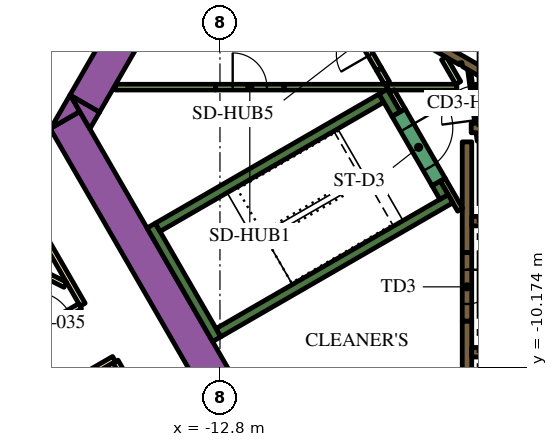
"""IFC4 building model, lengths in metres.
Left out: names, types, materials, properties, quantities, classifications, styles, units other than length and angle.
Written with IfcOpenShell. Run it as: python <this file> out.ifc"""

import sys

from ifc_helpers import new_model, si_unit, direction, frame, frame_2d, origin, place, context, subcontext, project, spatial, polyline, rectangle, outline, extrude, element, fill, save


model = new_model("IFC4")
c1 = context("Model", 3, precision=1e-05, world=origin(), true_north=direction((0.0, 1.0)))
c2 = subcontext(c1, "Body", "Model", "MODEL_VIEW")
j1 = project(units=[si_unit("LENGTHUNIT", "METRE"), si_unit("PLANEANGLEUNIT", "RADIAN")], contexts=[c1])
p1 = place(None, origin())
s1 = spatial("IfcSite", under=j1, at=p1, CompositionType="ELEMENT")
p2 = place(p1, origin())
s2 = spatial("IfcBuilding", under=s1, at=p2, CompositionType="ELEMENT")
p3 = place(p2, frame((0.0, 0.0, 126.6)))
s3 = spatial("IfcBuildingStorey", under=s2, at=p3, CompositionType="ELEMENT", Elevation=126.6)
p4 = place(p3, frame((-12.134, -11.883, 0.0), z_axis=(0.0, 0.0, 1.0), x_axis=(-0.500005339912, 0.866022320763, 0.0)))
e1 = element("IfcWall", 1, at=p4, inside=s3, PredefinedType="SOLIDWALL", context=c2, shape_type="SweptSolid", body=[
    extrude(rectangle(XDim=9.488, YDim=0.9, at=frame_2d((4.744, 0.0))), origin(), (0.0, 0.0, 1.0), 3.9),
])
p5 = place(p3, origin())
e2 = element("IfcWall", 2, at=p5, inside=s3, PredefinedType="SOLIDWALL", context=c2, shape_type="SweptSolid", body=[
    extrude(outline(polyline([(-16.489, -3.44), (-17.251, -3.88), (-16.743, -3.0), (-16.489, -3.44)])), origin(), (0.0, 0.0, 1.0), 3.9),
])
p6 = place(p3, frame((-15.118, -1.085, 0.0), z_axis=(0.0, 0.0, 1.0), x_axis=(-0.50006606081, -0.865987260198, 0.0)))
e3 = element("IfcWall", 3, at=p6, inside=s3, PredefinedType="SOLIDWALL", context=c2, shape_type="SweptSolid", body=[
    extrude(rectangle(XDim=2.481, YDim=0.9, at=frame_2d((1.24, 0.0))), origin(), (0.0, 0.0, 1.0), 3.9),
])
e4 = element("IfcWall", 4, at=p5, inside=s3, PredefinedType="SOLIDWALL", context=c2, shape_type="SweptSolid", body=[
    extrude(outline(polyline([(-16.223, -3.9), (-16.732, -3.02), (-15.969, -3.46), (-16.223, -3.9)])), origin(), (0.0, 0.0, 1.0), 3.9),
])
p7 = place(p3, frame((-12.885, -9.431, 0.0), z_axis=(0.0, 0.0, 1.0), x_axis=(-0.500020560727, 0.866013532718, 0.0)))
e5 = element("IfcWall", 5, at=p7, inside=s3, PredefinedType="SOLIDWALL", context=c2, shape_type="SweptSolid", body=[
    extrude(rectangle(XDim=3.45, YDim=0.25, at=frame_2d((1.725, 0.0))), origin(), (0.0, 0.0, 1.0), 3.9),
])
p8 = place(p3, frame((-14.44, -6.49, 0.0), z_axis=(0.0, 0.0, 1.0), x_axis=(0.866022966069, 0.500004222222, 0.0)))
e6 = element("IfcWall", 6, at=p8, inside=s3, PredefinedType="SOLIDWALL", context=c2, shape_type="SweptSolid", body=[
    extrude(rectangle(XDim=6.8, YDim=0.25, at=frame_2d((3.4, 0.0))), origin(), (0.0, 0.0, 1.0), 3.9),
])
p9 = place(p3, frame((-8.163, -3.511, 0.0), z_axis=(0.0, 0.0, 1.0), x_axis=(-0.500206266495, 0.865906283012, 0.0)))
e7 = element("IfcWall", 7, at=p9, inside=s3, PredefinedType="SOLIDWALL", context=c2, shape_type="SweptSolid", body=[
    extrude(rectangle(XDim=0.684, YDim=0.25, at=frame_2d((0.342, 0.0))), origin(), (0.0, 0.0, 1.0), 3.9),
])
p10 = place(p3, frame((-12.84, -9.261, 0.0), z_axis=(0.0, 0.0, 1.0), x_axis=(0.866016039709, 0.500016218704, 0.0)))
e8 = element("IfcWall", 8, at=p10, inside=s3, PredefinedType="SOLIDWALL", context=c2, shape_type="SweptSolid", body=[
    extrude(rectangle(XDim=7.05, YDim=0.25, at=frame_2d((3.525, 0.0))), origin(), (0.0, 0.0, 1.0), 3.9),
])
p11 = place(p3, frame((-6.905, -5.69, 0.0), z_axis=(0.0, 0.0, 1.0), x_axis=(-0.499993700073, 0.866029041019, 0.0)))
e9 = element("IfcWall", 9, at=p11, inside=s3, PredefinedType="SOLIDWALL", context=c2, shape_type="SweptSolid", body=[
    extrude(rectangle(XDim=0.416, YDim=0.25, at=frame_2d((0.208, 0.0))), origin(), (0.0, 0.0, 1.0), 3.9),
])
p12 = place(p3, frame((-6.3, -12.1, 0.0), z_axis=(0.0, 0.0, 1.0), x_axis=(0.0, 1.0, 0.0)))
e10 = element("IfcWall", 10, at=p12, inside=s3, PredefinedType="SOLIDWALL", context=c2, shape_type="SweptSolid", body=[
    extrude(rectangle(XDim=3.146, YDim=0.25, at=frame_2d((1.573, 0.0))), origin(), (0.0, 0.0, 1.0), 3.9),
])
p13 = place(p3, frame((-6.3, -4.24, 0.0), z_axis=(0.0, 0.0, 1.0), x_axis=(0.0, -1.0, 0.0)))
e11 = element("IfcWall", 11, at=p13, inside=s3, PredefinedType="SOLIDWALL", context=c2, shape_type="SweptSolid", body=[
    extrude(rectangle(XDim=2.914, YDim=0.25, at=frame_2d((1.457, 0.0))), origin(), (0.0, 0.0, 1.0), 3.9),
])
p14 = place(p3, frame((-6.19, -3.875, 0.0), z_axis=(0.0, 0.0, 1.0), x_axis=(1.0, 0.0, 0.0)))
e12 = element("IfcWall", 12, at=p14, inside=s3, PredefinedType="SOLIDWALL", context=c2, shape_type="SweptSolid", body=[
    extrude(rectangle(XDim=12.615, YDim=0.25, at=frame_2d((6.307, 0.0))), origin(), (0.0, 0.0, 1.0), 3.9),
])
e13 = element("IfcWall", 13, at=p5, inside=s3, PredefinedType="SOLIDWALL", context=c2, shape_type="SweptSolid", body=[
    extrude(outline(polyline([(-5.922, -2.257), (-5.922, -2.257), (-5.705, -2.382), (-5.83, -2.598), (-6.418, -2.258), (-6.433, -2.153), (-6.433, -2.153), (-6.433, -2.153), (-6.508, -2.163), (-6.508, -2.163), (-6.508, -2.163), (-6.501, -2.21), (-7.952, -1.373), (-7.827, -1.156), (-5.922, -2.257)])), origin(), (0.0, 0.0, 1.0), 3.9),
])
p15 = place(p3, frame((-6.48, -6.027, 0.0), z_axis=(0.0, 0.0, 1.0), x_axis=(-0.499936960004, 0.866061796884, 0.0)))
e14 = element("IfcWall", 14, at=p15, inside=s3, PredefinedType="PARTITIONING", context=c2, shape_type="SweptSolid", body=[
    extrude(rectangle(XDim=0.919, YDim=0.15, at=frame_2d((0.46, 0.0))), origin(), (0.0, 0.0, 1.0), 3.9),
])
p16 = place(p3, frame((-12.915, -2.8, 0.0), z_axis=(0.0, 0.0, 1.0), x_axis=(-1.0, 0.0, 0.0)))
e15 = element("IfcWall", 15, at=p16, inside=s3, PredefinedType="PARTITIONING", context=c2, shape_type="SweptSolid", body=[
    extrude(rectangle(XDim=2.637, YDim=0.15, at=frame_2d((1.318, 0.0))), origin(), (0.0, 0.0, 1.0), 2.75),
])
p17 = place(p3, frame((-8.395, -2.8, 0.0), z_axis=(0.0, 0.0, 1.0), x_axis=(1.0, 0.0, 0.0)))
e16 = element("IfcWall", 16, at=p17, inside=s3, PredefinedType="PARTITIONING", context=c2, shape_type="SweptSolid", body=[
    extrude(rectangle(XDim=1.828, YDim=0.15, at=frame_2d((0.914, 0.0))), origin(), (0.0, 0.0, 1.0), 2.75),
])
p18 = place(p3, frame((-11.115, -2.8, 0.0), z_axis=(0.0, 0.0, 1.0), x_axis=(1.0, 0.0, 0.0)))
e17 = element("IfcWall", 17, at=p18, inside=s3, PredefinedType="PARTITIONING", context=c2, shape_type="SweptSolid", body=[
    extrude(rectangle(XDim=2.708, YDim=0.15, at=frame_2d((1.354, 0.0))), origin(), (0.0, 0.0, 1.0), 2.75),
])
p19 = place(p3, frame((-6.531, -2.689, 0.0), z_axis=(0.0, 0.0, 1.0), x_axis=(-0.499967446111, 0.866044197965, 0.0)))
e18 = element("IfcWall", 18, at=p19, inside=s3, PredefinedType="PARTITIONING", context=c2, shape_type="SweptSolid", body=[
    extrude(rectangle(XDim=0.748, YDim=0.15, at=frame_2d((0.374, 0.0))), origin(), (0.0, 0.0, 1.0), 2.75),
])
p20 = place(p3, frame((-7.99, -3.412, 0.0), z_axis=(0.0, 0.0, 1.0), x_axis=(-0.500193841991, 0.86591346013, 0.0)))
e19 = element("IfcWall", 19, at=p20, inside=s3, PredefinedType="PARTITIONING", context=c2, shape_type="SweptSolid", body=[
    extrude(rectangle(XDim=0.583, YDim=0.15, at=frame_2d((0.292, 0.0))), origin(), (0.0, 0.0, 1.0), 2.75),
])
p21 = place(p3, frame((-8.612, -2.333, 0.0), z_axis=(0.0, 0.0, 1.0), x_axis=(0.500248216681, -0.86588204838, 0.0)))
e20 = element("IfcWall", 20, at=p21, inside=s3, PredefinedType="PARTITIONING", context=c2, shape_type="SweptSolid", body=[
    extrude(rectangle(XDim=0.415, YDim=0.15, at=frame_2d((0.208, 0.0))), origin(), (0.0, 0.0, 1.0), 2.75),
])
p22 = place(p3, frame((-6.086, -2.801, 0.0), z_axis=(0.0, 0.0, 1.0), x_axis=(1.0, 0.0, 0.0)))
e21 = element("IfcWall", 21, at=p22, inside=s3, PredefinedType="PARTITIONING", context=c2, shape_type="SweptSolid", body=[
    extrude(rectangle(XDim=7.524, YDim=0.15, at=frame_2d((3.762, 0.0))), origin(), (0.0, 0.0, 1.0), 2.75),
])
p23 = place(p3, frame((-6.175, -9.775, 0.0), z_axis=(0.0, 0.0, 1.0), x_axis=(1.0, 0.0, 0.0)))
e22 = element("IfcWall", 22, at=p23, inside=s3, PredefinedType="SOLIDWALL", context=c2, shape_type="SweptSolid", body=[
    extrude(rectangle(XDim=12.35, YDim=0.25, at=frame_2d((6.175, 0.0))), origin(), (0.0, 0.0, 1.0), 3.9),
])
p24 = place(p23, frame((0.585, 0.0, 0.0)))
e23 = element("IfcOpeningElement", 23, at=p24, cuts=e22, PredefinedType="OPENING", context=c2, shape_type="SweptSolid", body=[
    extrude(rectangle(XDim=1.1, YDim=2.1, at=frame_2d((0.55, 1.05))), frame((0.0, 0.135, 0.0), z_axis=(0.0, -1.0, 0.0), x_axis=(1.0, 0.0, 0.0)), (0.0, 0.0, 1.0), 0.27),
])
p25 = place(p23, frame((3.105, 0.0, 0.0)))
e24 = element("IfcOpeningElement", 24, at=p25, cuts=e22, PredefinedType="OPENING", context=c2, shape_type="SweptSolid", body=[
    extrude(rectangle(XDim=1.1, YDim=2.1, at=frame_2d((0.55, 1.05))), frame((0.0, 0.135, 0.0), z_axis=(0.0, -1.0, 0.0), x_axis=(1.0, 0.0, 0.0)), (0.0, 0.0, 1.0), 0.27),
])
p26 = place(p23, frame((5.625, 0.0, 0.0)))
e25 = element("IfcOpeningElement", 25, at=p26, cuts=e22, PredefinedType="OPENING", context=c2, shape_type="SweptSolid", body=[
    extrude(rectangle(XDim=1.1, YDim=2.1, at=frame_2d((0.55, 1.05))), frame((0.0, 0.135, 0.0), z_axis=(0.0, -1.0, 0.0), x_axis=(1.0, 0.0, 0.0)), (0.0, 0.0, 1.0), 0.27),
])
p27 = place(p23, frame((8.145, 0.0, 0.0)))
e26 = element("IfcOpeningElement", 26, at=p27, cuts=e22, PredefinedType="OPENING", context=c2, shape_type="SweptSolid", body=[
    extrude(rectangle(XDim=1.1, YDim=2.1, at=frame_2d((0.55, 1.05))), frame((0.0, 0.135, 0.0), z_axis=(0.0, -1.0, 0.0), x_axis=(1.0, 0.0, 0.0)), (0.0, 0.0, 1.0), 0.27),
])
p28 = place(p23, frame((10.665, 0.0, 0.0)))
e27 = element("IfcOpeningElement", 27, at=p28, cuts=e22, PredefinedType="OPENING", context=c2, shape_type="SweptSolid", body=[
    extrude(rectangle(XDim=1.1, YDim=2.1, at=frame_2d((0.55, 1.05))), frame((0.0, 0.135, 0.0), z_axis=(0.0, -1.0, 0.0), x_axis=(1.0, 0.0, 0.0)), (0.0, 0.0, 1.0), 0.27),
])
p29 = place(p3, frame((-6.175, -6.325, 0.0), z_axis=(0.0, 0.0, 1.0), x_axis=(1.0, 0.0, 0.0)))
e28 = element("IfcWall", 28, at=p29, inside=s3, PredefinedType="SOLIDWALL", context=c2, shape_type="SweptSolid", body=[
    extrude(rectangle(XDim=12.35, YDim=0.25, at=frame_2d((6.175, 0.0))), origin(), (0.0, 0.0, 1.0), 3.9),
])
p30 = place(p29, frame((3.205, 0.0, 0.0)))
e29 = element("IfcOpeningElement", 29, at=p30, cuts=e28, PredefinedType="OPENING", context=c2, shape_type="SweptSolid", body=[
    extrude(rectangle(XDim=0.9, YDim=2.1, at=frame_2d((0.45, 1.05))), frame((0.0, 0.135, 0.0), z_axis=(0.0, -1.0, 0.0), x_axis=(1.0, 0.0, 0.0)), (0.0, 0.0, 1.0), 0.27),
])
p31 = place(p29, frame((8.145, 0.0, 0.0)))
e30 = element("IfcOpeningElement", 30, at=p31, cuts=e28, PredefinedType="OPENING", context=c2, shape_type="SweptSolid", body=[
    extrude(rectangle(XDim=1.1, YDim=2.1, at=frame_2d((0.55, 1.05))), frame((0.0, 0.135, 0.0), z_axis=(0.0, -1.0, 0.0), x_axis=(1.0, 0.0, 0.0)), (0.0, 0.0, 1.0), 0.27),
])
p32 = place(p29, frame((10.665, 0.0, 0.0)))
e31 = element("IfcOpeningElement", 31, at=p32, cuts=e28, PredefinedType="OPENING", context=c2, shape_type="SweptSolid", body=[
    extrude(rectangle(XDim=1.1, YDim=2.1, at=frame_2d((0.55, 1.05))), frame((0.0, 0.135, 0.0), z_axis=(0.0, -1.0, 0.0), x_axis=(1.0, 0.0, 0.0)), (0.0, 0.0, 1.0), 0.27),
])
p33 = place(p3, frame((-8.098, -3.474, 0.0), z_axis=(0.0, 0.0, 1.0), x_axis=(0.49994051562, -0.866059744384, 0.0)))
e32 = element("IfcWall", 32, at=p33, inside=s3, PredefinedType="SOLIDWALL", context=c2, shape_type="SweptSolid", body=[
    extrude(rectangle(XDim=2.1, YDim=0.4, at=frame_2d((1.05, 0.0))), origin(), (0.0, 0.0, 1.0), 3.9),
])
p34 = place(p33, frame((0.45, 0.0, 0.0)))
e33 = element("IfcOpeningElement", 33, at=p34, cuts=e32, PredefinedType="OPENING", context=c2, shape_type="SweptSolid", body=[
    extrude(rectangle(XDim=1.2, YDim=2.1, at=frame_2d((0.6, 1.05))), frame((0.0, 0.21, 0.0), z_axis=(0.0, -1.0, 0.0), x_axis=(1.0, 0.0, 0.0)), (0.0, 0.0, 1.0), 0.42),
])
p35 = place(p3, frame((-6.3, -7.154, 0.0), z_axis=(0.0, 0.0, 1.0), x_axis=(0.0, -1.0, 0.0)))
e34 = element("IfcWall", 34, at=p35, inside=s3, PredefinedType="SOLIDWALL", context=c2, shape_type="SweptSolid", body=[
    extrude(rectangle(XDim=1.8, YDim=0.25, at=frame_2d((0.9, 0.0))), origin(), (0.0, 0.0, 1.0), 3.9),
])
p36 = place(p35, frame((0.45, 0.0, 0.0)))
e35 = element("IfcOpeningElement", 35, at=p36, cuts=e34, PredefinedType="OPENING", context=c2, shape_type="SweptSolid", body=[
    extrude(rectangle(XDim=0.9, YDim=2.1, at=frame_2d((0.45, 1.05))), frame((0.0, 0.135, 0.0), z_axis=(0.0, -1.0, 0.0), x_axis=(1.0, 0.0, 0.0)), (0.0, 0.0, 1.0), 0.27),
])
p37 = place(p3, frame((-5.995, -4.213, 0.0), z_axis=(0.0, 0.0, 1.0), x_axis=(-0.132072335448, 0.991240081014, 0.0)))
e36 = element("IfcWall", 36, at=p37, inside=s3, PredefinedType="PARTITIONING", context=c2, shape_type="SweptSolid", body=[
    extrude(rectangle(XDim=2.1, YDim=0.076, at=frame_2d((1.05, 0.0))), origin(), (0.0, 0.0, 1.0), 2.75),
])
p38 = place(p37, frame((0.55, 0.0, 0.0)))
e37 = element("IfcOpeningElement", 37, at=p38, cuts=e36, PredefinedType="OPENING", context=c2, shape_type="SweptSolid", body=[
    extrude(rectangle(XDim=0.9, YDim=2.1, at=frame_2d((0.45, 1.05))), frame((0.0, 0.048, 0.0), z_axis=(0.0, -1.0, 0.0), x_axis=(1.0, 0.0, 0.0)), (0.0, 0.0, 1.0), 0.096),
])
p39 = place(p3, frame((-12.915, -2.8, 0.0), z_axis=(0.0, 0.0, 1.0), x_axis=(1.0, 0.0, 0.0)))
e38 = element("IfcWall", 38, at=p39, inside=s3, PredefinedType="PARTITIONING", context=c2, shape_type="SweptSolid", body=[
    extrude(rectangle(XDim=1.8, YDim=0.15, at=frame_2d((0.9, 0.0))), origin(), (0.0, 0.0, 1.0), 2.75),
])
p40 = place(p39, frame((0.45, 0.0, 0.0)))
e39 = element("IfcOpeningElement", 39, at=p40, cuts=e38, PredefinedType="OPENING", context=c2, shape_type="SweptSolid", body=[
    extrude(rectangle(XDim=0.9, YDim=2.1, at=frame_2d((0.45, 1.05))), frame((0.0, 0.085, 0.0), z_axis=(0.0, -1.0, 0.0), x_axis=(1.0, 0.0, 0.0)), (0.0, 0.0, 1.0), 0.17),
])
p41 = place(p3, frame((-8.612, -2.333, 0.0), z_axis=(0.0, 0.0, 1.0), x_axis=(-0.499961193289, 0.866047807691, 0.0)))
e40 = element("IfcWall", 40, at=p41, inside=s3, PredefinedType="PARTITIONING", context=c2, shape_type="SweptSolid", body=[
    extrude(rectangle(XDim=1.8, YDim=0.15, at=frame_2d((0.9, 0.0))), origin(), (0.0, 0.0, 1.0), 2.75),
])
p42 = place(p41, frame((0.45, 0.0, 0.0)))
e41 = element("IfcOpeningElement", 41, at=p42, cuts=e40, PredefinedType="OPENING", context=c2, shape_type="SweptSolid", body=[
    extrude(rectangle(XDim=0.9, YDim=2.1, at=frame_2d((0.45, 1.05))), frame((0.0, 0.085, 0.0), z_axis=(0.0, -1.0, 0.0), x_axis=(1.0, 0.0, 0.0)), (0.0, 0.0, 1.0), 0.17),
])
p43 = place(p3, frame((-19.081, -3.9, 0.0), z_axis=(0.0, 0.0, 1.0), x_axis=(0.499998313975, 0.866026377209, 0.0)))
e42 = element("IfcWall", 42, at=p43, inside=s3, PredefinedType="PARTITIONING", context=c2, shape_type="SweptSolid", body=[
    extrude(rectangle(XDim=25.766, YDim=0.15, at=frame_2d((12.883, 0.0))), origin(), (0.0, 0.0, 1.0), 2.75),
])
p44 = place(p43, frame((19.306, 0.0, 0.0)))
e43 = element("IfcOpeningElement", 43, at=p44, cuts=e42, PredefinedType="OPENING", context=c2, shape_type="SweptSolid", body=[
    extrude(rectangle(XDim=1.0, YDim=2.1, at=frame_2d((0.5, 1.05))), frame((0.0, 0.085, 0.0), z_axis=(0.0, -1.0, 0.0), x_axis=(1.0, 0.0, 0.0)), (0.0, 0.0, 1.0), 0.17),
])
p45 = place(p43, frame((18.0, 0.0, 0.0)))
e44 = element("IfcOpeningElement", 44, at=p45, cuts=e42, PredefinedType="OPENING", context=c2, shape_type="SweptSolid", body=[
    extrude(rectangle(XDim=1.0, YDim=2.1, at=frame_2d((0.5, 1.05))), frame((0.0, 0.085, 0.0), z_axis=(0.0, -1.0, 0.0), x_axis=(1.0, 0.0, 0.0)), (0.0, 0.0, 1.0), 0.17),
])
p46 = place(p43, frame((7.793, 0.0, 0.0)))
e45 = element("IfcOpeningElement", 45, at=p46, cuts=e42, PredefinedType="OPENING", context=c2, shape_type="SweptSolid", body=[
    extrude(rectangle(XDim=0.9, YDim=2.1, at=frame_2d((0.45, 1.05))), frame((0.0, 0.085, 0.0), z_axis=(0.0, -1.0, 0.0), x_axis=(1.0, 0.0, 0.0)), (0.0, 0.0, 1.0), 0.17),
])
p47 = place(p43, frame((4.674, 0.0, 0.0)))
e46 = element("IfcOpeningElement", 46, at=p47, cuts=e42, PredefinedType="OPENING", context=c2, shape_type="SweptSolid", body=[
    extrude(rectangle(XDim=0.9, YDim=2.1, at=frame_2d((0.45, 1.05))), frame((0.0, 0.085, 0.0), z_axis=(0.0, -1.0, 0.0), x_axis=(1.0, 0.0, 0.0)), (0.0, 0.0, 1.0), 0.17),
])
p48 = place(p43, frame((0.18, 0.0, 0.0)))
e47 = element("IfcOpeningElement", 47, at=p48, cuts=e42, PredefinedType="OPENING", context=c2, shape_type="SweptSolid", body=[
    extrude(rectangle(XDim=1.0, YDim=2.1, at=frame_2d((0.5, 1.05))), frame((0.0, 0.085, 0.0), z_axis=(0.0, -1.0, 0.0), x_axis=(1.0, 0.0, 0.0)), (0.0, 0.0, 1.0), 0.17),
])
p49 = place(p3, frame((-16.412, -8.523, 0.0), z_axis=(0.0, 0.0, 1.0), x_axis=(-0.500001929737, 0.866024289647, 0.0)))
e48 = element("IfcWall", 48, at=p49, inside=s3, PredefinedType="PARTITIONING", context=c2, shape_type="SweptSolid", body=[
    extrude(rectangle(XDim=5.268, YDim=0.15, at=frame_2d((2.634, 0.0))), origin(), (0.0, 0.0, 1.0), 2.75),
])
p50 = place(p3, frame((-28.211, -15.335, 0.0), z_axis=(0.0, 0.0, 1.0), x_axis=(0.866025884867, 0.49999916674, 0.0)))
e49 = element("IfcWall", 49, at=p50, inside=s3, PredefinedType="PARTITIONING", context=c2, shape_type="SweptSolid", body=[
    extrude(rectangle(XDim=13.543, YDim=0.15, at=frame_2d((6.772, 0.0))), origin(), (0.0, 0.0, 1.0), 2.75),
])
p51 = place(p50, frame((12.114, 0.0, 0.0)))
e50 = element("IfcOpeningElement", 50, at=p51, cuts=e49, PredefinedType="OPENING", context=c2, shape_type="SweptSolid", body=[
    extrude(rectangle(XDim=1.1, YDim=2.1, at=frame_2d((0.55, 1.05))), frame((0.0, 0.085, 0.0), z_axis=(0.0, -1.0, 0.0), x_axis=(1.0, 0.0, 0.0)), (0.0, 0.0, 1.0), 0.17),
])
p52 = place(p50, frame((4.65, 0.0, 0.0)))
e51 = element("IfcOpeningElement", 51, at=p52, cuts=e49, PredefinedType="OPENING", context=c2, shape_type="SweptSolid", body=[
    extrude(rectangle(XDim=1.0, YDim=2.1, at=frame_2d((0.5, 1.05))), frame((0.0, 0.085, 0.0), z_axis=(0.0, -1.0, 0.0), x_axis=(1.0, 0.0, 0.0)), (0.0, 0.0, 1.0), 0.17),
])
p53 = place(p3, frame((-15.587, -9.952, 0.0), z_axis=(0.0, 0.0, 1.0), x_axis=(-0.866017869832, -0.500013048961, 0.0)))
e52 = element("IfcWall", 52, at=p53, inside=s3, PredefinedType="PARTITIONING", context=c2, shape_type="SweptSolid", body=[
    extrude(rectangle(XDim=13.624, YDim=0.15, at=frame_2d((6.812, 0.0))), origin(), (0.0, 0.0, 1.0), 2.75),
])
p54 = place(p53, frame((12.344, 0.0, 0.0)))
e53 = element("IfcOpeningElement", 53, at=p54, cuts=e52, PredefinedType="OPENING", context=c2, shape_type="SweptSolid", body=[
    extrude(rectangle(XDim=1.1, YDim=2.1, at=frame_2d((0.55, 1.05))), frame((0.0, 0.085, 0.0), z_axis=(0.0, -1.0, 0.0), x_axis=(1.0, 0.0, 0.0)), (0.0, 0.0, 1.0), 0.17),
])
p55 = place(p3, frame((-12.918, -14.575, 0.0), z_axis=(0.0, 0.0, 1.0), x_axis=(-0.500009150678, 0.866020120573, 0.0)))
e54 = element("IfcWall", 54, at=p55, inside=s3, PredefinedType="PARTITIONING", context=c2, shape_type="SweptSolid", body=[
    extrude(rectangle(XDim=5.258, YDim=0.15, at=frame_2d((2.629, 0.0))), origin(), (0.0, 0.0, 1.0), 2.75),
])
p56 = place(p3, frame((-26.591, -3.122, 0.0), z_axis=(0.0, 0.0, 1.0), x_axis=(0.893766213273, -0.448533115847, 0.0)))
e55 = element("IfcWall", 55, at=p56, inside=s3, PredefinedType="PARTITIONING", context=c2, shape_type="SweptSolid", body=[
    extrude(rectangle(XDim=10.875, YDim=0.15, at=frame_2d((5.438, 0.0))), origin(), (0.0, 0.0, 1.0), 2.75),
])
p57 = place(p34, origin())
e56 = element("IfcDoor", 56, at=p57, inside=s3, OperationType="SINGLE_SWING_LEFT", PredefinedType="DOOR", context=c2, shape_type="SweptSolid", body=[
    extrude(rectangle(XDim=1.2, YDim=2.1, at=frame_2d((0.6, 1.05))), frame((0.0, 0.025, 0.0), z_axis=(0.0, -1.0, 0.0), x_axis=(1.0, 0.0, 0.0)), (0.0, 0.0, 1.0), 0.05),
])
fill(e33, e56)
p58 = place(p36, origin())
e57 = element("IfcDoor", 57, at=p58, inside=s3, OperationType="SINGLE_SWING_LEFT", PredefinedType="DOOR", context=c2, shape_type="SweptSolid", body=[
    extrude(rectangle(XDim=0.9, YDim=2.1, at=frame_2d((0.45, 1.05))), frame((0.0, 0.025, 0.0), z_axis=(0.0, -1.0, 0.0), x_axis=(1.0, 0.0, 0.0)), (0.0, 0.0, 1.0), 0.05),
])
fill(e35, e57)
p59 = place(p38, origin())
e58 = element("IfcDoor", 58, at=p59, inside=s3, OperationType="SINGLE_SWING_LEFT", PredefinedType="DOOR", context=c2, shape_type="SweptSolid", body=[
    extrude(rectangle(XDim=0.9, YDim=2.1, at=frame_2d((0.45, 1.05))), frame((0.0, 0.025, 0.0), z_axis=(0.0, -1.0, 0.0), x_axis=(1.0, 0.0, 0.0)), (0.0, 0.0, 1.0), 0.05),
])
fill(e37, e58)
p60 = place(p40, origin())
e59 = element("IfcDoor", 59, at=p60, inside=s3, OperationType="SINGLE_SWING_LEFT", PredefinedType="DOOR", context=c2, shape_type="SweptSolid", body=[
    extrude(rectangle(XDim=0.9, YDim=2.1, at=frame_2d((0.45, 1.05))), frame((0.0, 0.025, 0.0), z_axis=(0.0, -1.0, 0.0), x_axis=(1.0, 0.0, 0.0)), (0.0, 0.0, 1.0), 0.05),
])
fill(e39, e59)
p61 = place(p42, origin())
e60 = element("IfcDoor", 60, at=p61, inside=s3, OperationType="SINGLE_SWING_LEFT", PredefinedType="DOOR", context=c2, shape_type="SweptSolid", body=[
    extrude(rectangle(XDim=0.9, YDim=2.1, at=frame_2d((0.45, 1.05))), frame((0.0, 0.025, 0.0), z_axis=(0.0, -1.0, 0.0), x_axis=(1.0, 0.0, 0.0)), (0.0, 0.0, 1.0), 0.05),
])
fill(e41, e60)
p62 = place(p51, origin())
e61 = element("IfcDoor", 61, at=p62, inside=s3, OperationType="SINGLE_SWING_RIGHT", PredefinedType="DOOR", context=c2, shape_type="SweptSolid", body=[
    extrude(rectangle(XDim=1.1, YDim=2.1, at=frame_2d((0.55, 1.05))), frame((0.0, 0.025, 0.0), z_axis=(0.0, -1.0, 0.0), x_axis=(1.0, 0.0, 0.0)), (0.0, 0.0, 1.0), 0.05),
])
fill(e50, e61)
save(model, sys.argv[1])
